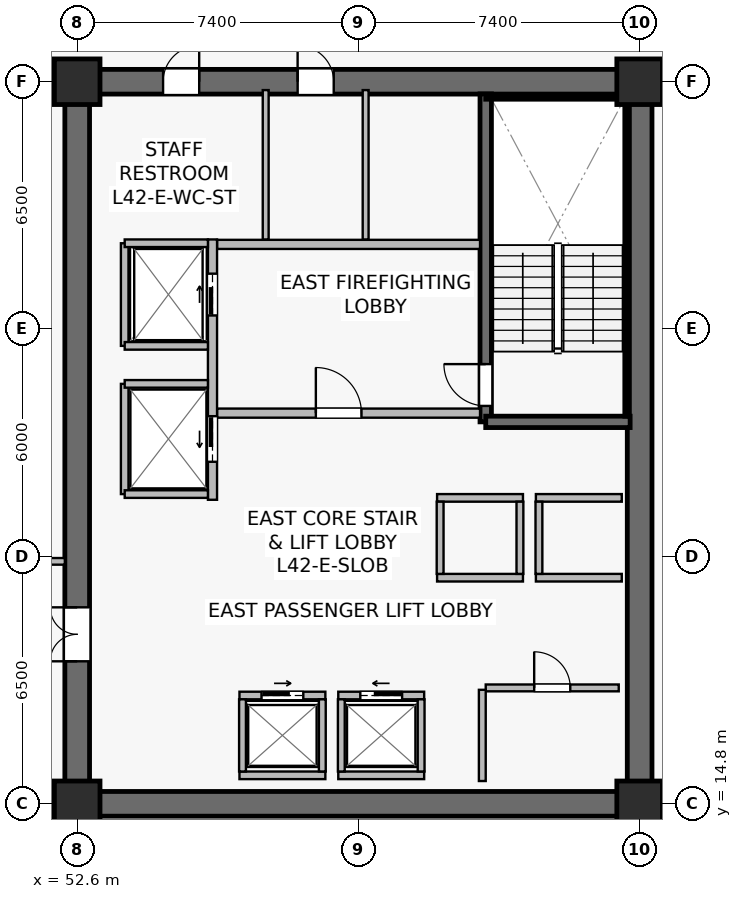
"""IFC4 building model, lengths in metres.
Left out: names, types, materials, properties, quantities, classifications, styles, units other than length and angle.
Written with IfcOpenShell. Run it as: python <this file> out.ifc"""

import sys

from ifc_helpers import new_model, si_unit, direction, frame, frame_2d, origin, origin_2d, place, context, subcontext, project, spatial, rectangle, extrude, source, transform, mapped, element, fill, save


model = new_model("IFC4")
c1 = context("Model", 3, precision=1e-05, world=origin(), true_north=direction((0.0, 1.0)))
c2 = subcontext(c1, "Body", "Model", "MODEL_VIEW")
j1 = project(units=[si_unit("LENGTHUNIT", "METRE"), si_unit("PLANEANGLEUNIT", "RADIAN")], contexts=[c1])
p1 = place(None, origin())
s1 = spatial("IfcSite", under=j1, at=p1, CompositionType="ELEMENT")
p2 = place(p1, origin())
s2 = spatial("IfcBuilding", under=s1, at=p2, CompositionType="ELEMENT")
p3 = place(p2, frame((0.0, 0.0, 174.8)))
s3 = spatial("IfcBuildingStorey", under=s2, at=p3, CompositionType="ELEMENT", Elevation=174.8)
p4 = place(p3, frame((52.275, 14.8, 0.0), z_axis=(0.0, 0.0, 1.0), x_axis=(1.0, 0.0, 0.0)))
e1 = element("IfcWall", 1, at=p4, inside=s3, PredefinedType="SHEAR", context=c2, shape_type="SweptSolid", body=[
    extrude(rectangle(XDim=15.45, YDim=0.65, at=frame_2d((7.725, 0.0))), origin(), (0.0, 0.0, 1.0), 3.79),
])
p5 = place(p3, frame((52.275, 33.8, 0.0), z_axis=(0.0, 0.0, 1.0), x_axis=(1.0, 0.0, 0.0)))
e2 = element("IfcWall", 2, at=p5, inside=s3, PredefinedType="SHEAR", context=c2, shape_type="SweptSolid", body=[
    extrude(rectangle(XDim=15.45, YDim=0.65, at=frame_2d((7.725, 0.0))), origin(), (0.0, 0.0, 1.0), 3.79),
])
p6 = place(p5, frame((6.125, 0.0, 0.0)))
e3 = element("IfcOpeningElement", 3, at=p6, cuts=e2, PredefinedType="OPENING", context=c2, shape_type="SweptSolid", body=[
    extrude(rectangle(XDim=0.95, YDim=2.15, at=frame_2d((0.475, 1.075))), frame((0.0, 0.335, 0.0), z_axis=(0.0, -1.0, 0.0), x_axis=(1.0, 0.0, 0.0)), (0.0, 0.0, 1.0), 0.67),
])
p7 = place(p5, frame((2.585, 0.0, 0.0)))
e4 = element("IfcOpeningElement", 4, at=p7, cuts=e2, PredefinedType="OPENING", context=c2, shape_type="SweptSolid", body=[
    extrude(rectangle(XDim=0.95, YDim=2.15, at=frame_2d((0.475, 1.075))), frame((0.0, 0.335, 0.0), z_axis=(0.0, -1.0, 0.0), x_axis=(1.0, 0.0, 0.0)), (0.0, 0.0, 1.0), 0.67),
])
p8 = place(p3, frame((52.6, 15.125, 0.0), z_axis=(0.0, 0.0, 1.0), x_axis=(0.0, 1.0, 0.0)))
e5 = element("IfcWall", 5, at=p8, inside=s3, PredefinedType="SHEAR", context=c2, shape_type="SweptSolid", body=[
    extrude(rectangle(XDim=18.35, YDim=0.65, at=frame_2d((9.175, 0.0))), origin(), (0.0, 0.0, 1.0), 3.79),
])
p9 = place(p8, frame((3.425, 0.0, 0.0)))
e6 = element("IfcOpeningElement", 6, at=p9, cuts=e5, PredefinedType="OPENING", context=c2, shape_type="SweptSolid", body=[
    extrude(rectangle(XDim=1.42, YDim=2.2, at=frame_2d((0.71, 1.1))), frame((0.0, 0.335, 0.0), z_axis=(0.0, -1.0, 0.0), x_axis=(1.0, 0.0, 0.0)), (0.0, 0.0, 1.0), 0.67),
])
p10 = place(p3, frame((67.4, 15.125, 0.0), z_axis=(0.0, 0.0, 1.0), x_axis=(0.0, 1.0, 0.0)))
e7 = element("IfcWall", 7, at=p10, inside=s3, PredefinedType="SHEAR", context=c2, shape_type="SweptSolid", body=[
    extrude(rectangle(XDim=18.35, YDim=0.65, at=frame_2d((9.175, 0.0))), origin(), (0.0, 0.0, 1.0), 3.79),
])
p11 = place(p3, frame((63.35, 24.85, 0.0), z_axis=(0.0, 0.0, 1.0), x_axis=(0.0, 1.0, 0.0)))
e8 = element("IfcWall", 8, at=p11, inside=s3, PredefinedType="SHEAR", context=c2, shape_type="SweptSolid", body=[
    extrude(rectangle(XDim=8.63, YDim=0.3, at=frame_2d((4.315, 0.0))), origin(), (0.0, 0.0, 1.0), 3.79),
])
p12 = place(p11, frame((0.42, 0.0, 0.0)))
e9 = element("IfcOpeningElement", 9, at=p12, cuts=e8, PredefinedType="OPENING", context=c2, shape_type="SweptSolid", body=[
    extrude(rectangle(XDim=1.1, YDim=2.15, at=frame_2d((0.55, 1.075))), frame((0.0, 0.16, 0.0), z_axis=(0.0, -1.0, 0.0), x_axis=(1.0, 0.0, 0.0)), (0.0, 0.0, 1.0), 0.32),
])
p13 = place(p3, frame((63.35, 24.85, 0.0), z_axis=(0.0, 0.0, 1.0), x_axis=(1.0, 0.0, 0.0)))
e10 = element("IfcWall", 10, at=p13, inside=s3, PredefinedType="SHEAR", context=c2, shape_type="SweptSolid", body=[
    extrude(rectangle(XDim=3.8, YDim=0.3, at=frame_2d((1.9, 0.0))), origin(), (0.0, 0.0, 1.0), 3.79),
])
p14 = place(p3, frame((63.35, 33.4, 0.0), z_axis=(0.0, 0.0, 1.0), x_axis=(1.0, 0.0, 0.0)))
e11 = element("IfcWall", 11, at=p14, inside=s3, PredefinedType="SOLIDWALL", context=c2, shape_type="SweptSolid", body=[
    extrude(rectangle(XDim=3.72, YDim=0.12, at=frame_2d((1.86, 0.0))), origin(), (0.0, 0.0, 1.0), 3.79),
])
p15 = place(p3, frame((67.07, 25.0, 0.0), z_axis=(0.0, 0.0, 1.0), x_axis=(0.0, 1.0, 0.0)))
e12 = element("IfcWall", 12, at=p15, inside=s3, PredefinedType="SOLIDWALL", context=c2, shape_type="SweptSolid", body=[
    extrude(rectangle(XDim=8.32, YDim=0.12, at=frame_2d((4.16, 0.0))), origin(), (0.0, 0.0, 1.0), 3.79),
])
m1 = source(origin(), c2, "Body", "SweptSolid", [
    extrude(rectangle(XDim=1.2, YDim=1.2, at=origin_2d()), origin(), (0.0, 0.0, 1.0), 4.1),
])
for number, where, z_axis, x_axis in (
    (13, (52.6, 14.8, 0.0), (0.0, 0.0, 1.0), (1.0, 0.0, 0.0)),
    (14, (67.4, 14.8, 0.0), (0.0, 0.0, 1.0), (1.0, 0.0, 0.0)),
    (15, (52.6, 33.8, 0.0), (0.0, 0.0, 1.0), (1.0, 0.0, 0.0)),
    (16, (67.4, 33.8, 0.0), (0.0, 0.0, 1.0), (1.0, 0.0, 0.0)),
):
    element("IfcColumn", number, at=place(p3, frame(where, z_axis=z_axis, x_axis=x_axis)), inside=s3, PredefinedType="COLUMN", context=c2, shape_type="MappedRepresentation", body=[
        mapped(m1, transform((0.0, 0.0, 0.0), scale=1.0)),
    ])
p16 = place(p3, frame((56.28, 25.08, 0.0), z_axis=(0.0, 0.0, 1.0), x_axis=(1.0, 0.0, 0.0)))
e17 = element("IfcWall", 17, at=p16, inside=s3, PredefinedType="SOLIDWALL", context=c2, shape_type="SweptSolid", body=[
    extrude(rectangle(XDim=6.92, YDim=0.24, at=frame_2d((3.46, 0.0))), origin(), (0.0, 0.0, 1.0), 3.187),
])
p17 = place(p16, frame((2.6, 0.0, 0.0)))
e18 = element("IfcOpeningElement", 18, at=p17, cuts=e17, PredefinedType="OPENING", context=c2, shape_type="SweptSolid", body=[
    extrude(rectangle(XDim=1.2, YDim=2.16, at=frame_2d((0.6, 1.08))), frame((0.0, 0.13, 0.0), z_axis=(0.0, -1.0, 0.0), x_axis=(1.0, 0.0, 0.0)), (0.0, 0.0, 1.0), 0.26),
])
p18 = place(p3, frame((56.28, 29.52, 0.0), z_axis=(0.0, 0.0, 1.0), x_axis=(1.0, 0.0, 0.0)))
e19 = element("IfcWall", 19, at=p18, inside=s3, PredefinedType="SOLIDWALL", context=c2, shape_type="SweptSolid", body=[
    extrude(rectangle(XDim=6.92, YDim=0.24, at=frame_2d((3.46, 0.0))), origin(), (0.0, 0.0, 1.0), 3.187),
])
p19 = place(p3, frame((56.16, 22.8, 0.0), z_axis=(0.0, 0.0, 1.0), x_axis=(0.0, 1.0, 0.0)))
e20 = element("IfcWall", 20, at=p19, inside=s3, PredefinedType="SOLIDWALL", context=c2, shape_type="SweptSolid", body=[
    extrude(rectangle(XDim=6.85, YDim=0.24, at=frame_2d((3.425, 0.0))), origin(), (0.0, 0.0, 1.0), 2.925),
])
p20 = place(p19, frame((4.85, 0.0, 0.0)))
e21 = element("IfcOpeningElement", 21, at=p20, cuts=e20, PredefinedType="OPENING", context=c2, shape_type="SweptSolid", body=[
    extrude(rectangle(XDim=1.1, YDim=2.22, at=frame_2d((0.55, 1.11))), frame((0.0, 0.13, 0.0), z_axis=(0.0, -1.0, 0.0), x_axis=(1.0, 0.0, 0.0)), (0.0, 0.0, 1.0), 0.26),
])
p21 = place(p19, frame((1.0, 0.0, 0.0)))
e22 = element("IfcOpeningElement", 22, at=p21, cuts=e20, PredefinedType="OPENING", context=c2, shape_type="SweptSolid", body=[
    extrude(rectangle(XDim=1.2, YDim=2.22, at=frame_2d((0.6, 1.11))), frame((0.0, 0.13, 0.0), z_axis=(0.0, -1.0, 0.0), x_axis=(1.0, 0.0, 0.0)), (0.0, 0.0, 1.0), 0.26),
])
p22 = place(p3, frame((59.47, 17.65, 0.0), z_axis=(0.0, 0.0, 1.0), x_axis=(1.0, 0.0, 0.0)))
e23 = element("IfcWall", 23, at=p22, inside=s3, PredefinedType="SOLIDWALL", context=c2, shape_type="SweptSolid", body=[
    extrude(rectangle(XDim=2.26, YDim=0.2, at=frame_2d((1.13, 0.0))), origin(), (0.0, 0.0, 1.0), 3.187),
])
p23 = place(p22, frame((0.58, 0.0, 0.0)))
e24 = element("IfcOpeningElement", 24, at=p23, cuts=e23, PredefinedType="OPENING", context=c2, shape_type="SweptSolid", body=[
    extrude(rectangle(XDim=1.1, YDim=2.22, at=frame_2d((0.55, 1.11))), frame((0.0, 0.11, 0.0), z_axis=(0.0, -1.0, 0.0), x_axis=(1.0, 0.0, 0.0)), (0.0, 0.0, 1.0), 0.22),
])
p24 = place(p3, frame((59.47, 15.55, 0.0), z_axis=(0.0, 0.0, 1.0), x_axis=(1.0, 0.0, 0.0)))
e25 = element("IfcWall", 25, at=p24, inside=s3, PredefinedType="SOLIDWALL", context=c2, shape_type="SweptSolid", body=[
    extrude(rectangle(XDim=2.26, YDim=0.2, at=frame_2d((1.13, 0.0))), origin(), (0.0, 0.0, 1.0), 3.187),
])
for number, where, z_axis, x_axis in (
    (26, (59.55, 15.65, 0.0), (0.0, 0.0, 1.0), (0.0, 1.0, 0.0)),
    (27, (61.65, 15.65, 0.0), (0.0, 0.0, 1.0), (0.0, 1.0, 0.0)),
):
    element("IfcWall", number, at=place(p3, frame(where, z_axis=z_axis, x_axis=x_axis)), inside=s3, PredefinedType="SOLIDWALL", context=c2, shape_type="SweptSolid", body=[
        extrude(rectangle(XDim=1.9, YDim=0.18, at=frame_2d((0.95, 0.0))), origin(), (0.0, 0.0, 1.0), 3.79),
    ])
p25 = place(p3, frame((56.87, 17.65, 0.0), z_axis=(0.0, 0.0, 1.0), x_axis=(1.0, 0.0, 0.0)))
e28 = element("IfcWall", 28, at=p25, inside=s3, PredefinedType="SOLIDWALL", context=c2, shape_type="SweptSolid", body=[
    extrude(rectangle(XDim=2.26, YDim=0.2, at=frame_2d((1.13, 0.0))), origin(), (0.0, 0.0, 1.0), 3.79),
])
p26 = place(p25, frame((0.58, 0.0, 0.0)))
e29 = element("IfcOpeningElement", 29, at=p26, cuts=e28, PredefinedType="OPENING", context=c2, shape_type="SweptSolid", body=[
    extrude(rectangle(XDim=1.1, YDim=2.22, at=frame_2d((0.55, 1.11))), frame((0.0, 0.11, 0.0), z_axis=(0.0, -1.0, 0.0), x_axis=(1.0, 0.0, 0.0)), (0.0, 0.0, 1.0), 0.22),
])
p27 = place(p3, frame((56.87, 15.55, 0.0), z_axis=(0.0, 0.0, 1.0), x_axis=(1.0, 0.0, 0.0)))
e30 = element("IfcWall", 30, at=p27, inside=s3, PredefinedType="SOLIDWALL", context=c2, shape_type="SweptSolid", body=[
    extrude(rectangle(XDim=2.26, YDim=0.2, at=frame_2d((1.13, 0.0))), origin(), (0.0, 0.0, 1.0), 3.79),
])
for number, where, z_axis, x_axis in (
    (31, (56.95, 15.65, 0.0), (0.0, 0.0, 1.0), (0.0, 1.0, 0.0)),
    (32, (59.05, 15.65, 0.0), (0.0, 0.0, 1.0), (0.0, 1.0, 0.0)),
):
    element("IfcWall", number, at=place(p3, frame(where, z_axis=z_axis, x_axis=x_axis)), inside=s3, PredefinedType="SOLIDWALL", context=c2, shape_type="SweptSolid", body=[
        extrude(rectangle(XDim=1.9, YDim=0.18, at=frame_2d((0.95, 0.0))), origin(), (0.0, 0.0, 1.0), 3.79),
    ])
for number, where, z_axis, x_axis in (
    (33, (64.67, 20.75, 0.0), (0.0, 0.0, 1.0), (1.0, 0.0, 0.0)),
    (34, (64.67, 22.85, 0.0), (0.0, 0.0, 1.0), (1.0, 0.0, 0.0)),
):
    element("IfcWall", number, at=place(p3, frame(where, z_axis=z_axis, x_axis=x_axis)), inside=s3, PredefinedType="SOLIDWALL", context=c2, shape_type="SweptSolid", body=[
        extrude(rectangle(XDim=2.26, YDim=0.2, at=frame_2d((1.13, 0.0))), origin(), (0.0, 0.0, 1.0), 3.79),
    ])
p28 = place(p3, frame((64.75, 20.85, 0.0), z_axis=(0.0, 0.0, 1.0), x_axis=(0.0, 1.0, 0.0)))
e35 = element("IfcWall", 35, at=p28, inside=s3, PredefinedType="SOLIDWALL", context=c2, shape_type="SweptSolid", body=[
    extrude(rectangle(XDim=1.9, YDim=0.18, at=frame_2d((0.95, 0.0))), origin(), (0.0, 0.0, 1.0), 3.79),
])
for number, where, z_axis, x_axis in (
    (36, (62.07, 20.75, 0.0), (0.0, 0.0, 1.0), (1.0, 0.0, 0.0)),
    (37, (62.07, 22.85, 0.0), (0.0, 0.0, 1.0), (1.0, 0.0, 0.0)),
):
    element("IfcWall", number, at=place(p3, frame(where, z_axis=z_axis, x_axis=x_axis)), inside=s3, PredefinedType="SOLIDWALL", context=c2, shape_type="SweptSolid", body=[
        extrude(rectangle(XDim=2.26, YDim=0.2, at=frame_2d((1.13, 0.0))), origin(), (0.0, 0.0, 1.0), 3.79),
    ])
for number, where, z_axis, x_axis in (
    (38, (62.15, 20.85, 0.0), (0.0, 0.0, 1.0), (0.0, 1.0, 0.0)),
    (39, (64.25, 20.85, 0.0), (0.0, 0.0, 1.0), (0.0, 1.0, 0.0)),
):
    element("IfcWall", number, at=place(p3, frame(where, z_axis=z_axis, x_axis=x_axis)), inside=s3, PredefinedType="SOLIDWALL", context=c2, shape_type="SweptSolid", body=[
        extrude(rectangle(XDim=1.9, YDim=0.18, at=frame_2d((0.95, 0.0))), origin(), (0.0, 0.0, 1.0), 3.79),
    ])
p29 = place(p3, frame((53.85, 26.85, 0.0), z_axis=(0.0, 0.0, 1.0), x_axis=(0.0, 1.0, 0.0)))
e40 = element("IfcWall", 40, at=p29, inside=s3, PredefinedType="SOLIDWALL", context=c2, shape_type="SweptSolid", body=[
    extrude(rectangle(XDim=2.7, YDim=0.2, at=frame_2d((1.35, 0.0))), origin(), (0.0, 0.0, 1.0), 3.79),
])
p30 = place(p3, frame((53.85, 29.55, 0.0), z_axis=(0.0, 0.0, 1.0), x_axis=(1.0, 0.0, 0.0)))
e41 = element("IfcWall", 41, at=p30, inside=s3, PredefinedType="SOLIDWALL", context=c2, shape_type="SweptSolid", body=[
    extrude(rectangle(XDim=2.19, YDim=0.2, at=frame_2d((1.095, 0.0))), origin(), (0.0, 0.0, 1.0), 3.79),
])
p31 = place(p3, frame((53.85, 26.85, 0.0), z_axis=(0.0, 0.0, 1.0), x_axis=(1.0, 0.0, 0.0)))
e42 = element("IfcWall", 42, at=p31, inside=s3, PredefinedType="SOLIDWALL", context=c2, shape_type="SweptSolid", body=[
    extrude(rectangle(XDim=2.19, YDim=0.2, at=frame_2d((1.095, 0.0))), origin(), (0.0, 0.0, 1.0), 3.187),
])
p32 = place(p3, frame((53.85, 22.95, 0.0), z_axis=(0.0, 0.0, 1.0), x_axis=(0.0, 1.0, 0.0)))
e43 = element("IfcWall", 43, at=p32, inside=s3, PredefinedType="SOLIDWALL", context=c2, shape_type="SweptSolid", body=[
    extrude(rectangle(XDim=2.9, YDim=0.2, at=frame_2d((1.45, 0.0))), origin(), (0.0, 0.0, 1.0), 2.925),
])
for number, where, z_axis, x_axis in (
    (44, (53.85, 25.85, 0.0), (0.0, 0.0, 1.0), (1.0, 0.0, 0.0)),
    (45, (53.85, 22.95, 0.0), (0.0, 0.0, 1.0), (1.0, 0.0, 0.0)),
):
    element("IfcWall", number, at=place(p3, frame(where, z_axis=z_axis, x_axis=x_axis)), inside=s3, PredefinedType="SOLIDWALL", context=c2, shape_type="SweptSolid", body=[
        extrude(rectangle(XDim=2.19, YDim=0.2, at=frame_2d((1.095, 0.0))), origin(), (0.0, 0.0, 1.0), 3.79),
    ])
p33 = place(p3, frame((63.35, 17.85, 0.0), z_axis=(0.0, 0.0, 1.0), x_axis=(1.0, 0.0, 0.0)))
e46 = element("IfcWall", 46, at=p33, inside=s3, PredefinedType="SOLIDWALL", context=c2, shape_type="SweptSolid", body=[
    extrude(rectangle(XDim=3.5, YDim=0.18, at=frame_2d((1.75, 0.0))), origin(), (0.0, 0.0, 1.0), 3.79),
])
p34 = place(p33, frame((1.275, 0.0, 0.0)))
e47 = element("IfcOpeningElement", 47, at=p34, cuts=e46, PredefinedType="OPENING", context=c2, shape_type="SweptSolid", body=[
    extrude(rectangle(XDim=0.95, YDim=2.15, at=frame_2d((0.475, 1.075))), frame((0.0, 0.1, 0.0), z_axis=(0.0, -1.0, 0.0), x_axis=(1.0, 0.0, 0.0)), (0.0, 0.0, 1.0), 0.2),
])
p35 = place(p3, frame((63.26, 15.4, 0.0), z_axis=(0.0, 0.0, 1.0), x_axis=(0.0, 1.0, 0.0)))
e48 = element("IfcWall", 48, at=p35, inside=s3, PredefinedType="SOLIDWALL", context=c2, shape_type="SweptSolid", body=[
    extrude(rectangle(XDim=2.4, YDim=0.18, at=frame_2d((1.2, 0.0))), origin(), (0.0, 0.0, 1.0), 3.79),
])
p36 = place(p3, frame((60.19, 29.65, 0.0), z_axis=(0.0, 0.0, 1.0), x_axis=(0.0, 1.0, 0.0)))
e49 = element("IfcWall", 49, at=p36, inside=s3, PredefinedType="PLUMBINGWALL", context=c2, shape_type="SweptSolid", body=[
    extrude(rectangle(XDim=3.93, YDim=0.155, at=frame_2d((1.965, 0.0))), origin(), (0.0, 0.0, 1.0), 3.187),
])
p37 = place(p3, frame((57.56, 29.65, 0.0), z_axis=(0.0, 0.0, 1.0), x_axis=(0.0, 1.0, 0.0)))
e50 = element("IfcWall", 50, at=p37, inside=s3, PredefinedType="PLUMBINGWALL", context=c2, shape_type="SweptSolid", body=[
    extrude(rectangle(XDim=3.93, YDim=0.155, at=frame_2d((1.965, 0.0))), origin(), (0.0, 0.0, 1.0), 3.79),
])
p38 = place(p3, frame((48.3, 34.26, 0.0), z_axis=(0.0, 0.0, 1.0), x_axis=(1.0, 0.0, 0.0)))
e51 = element("IfcWall", 51, at=p38, inside=s3, PredefinedType="PARTITIONING", context=c2, shape_type="SweptSolid", body=[
    extrude(rectangle(XDim=3.975, YDim=0.175, at=frame_2d((1.987, 0.0))), origin(), (0.0, 0.0, 1.0), 3.475),
])
p39 = place(p3, frame((48.3, 21.18, 0.0), z_axis=(0.0, 0.0, 1.0), x_axis=(1.0, 0.0, 0.0)))
e52 = element("IfcWall", 52, at=p39, inside=s3, PredefinedType="PARTITIONING", context=c2, shape_type="SweptSolid", body=[
    extrude(rectangle(XDim=3.975, YDim=0.175, at=frame_2d((1.987, 0.0))), origin(), (0.0, 0.0, 1.0), 3.79),
])
p40 = place(p39, frame((1.35, 0.0, 0.0)))
e53 = element("IfcOpeningElement", 53, at=p40, cuts=e52, PredefinedType="OPENING", context=c2, shape_type="SweptSolid", body=[
    extrude(rectangle(XDim=0.95, YDim=2.15, at=frame_2d((0.475, 1.075))), frame((0.0, 0.098, 0.0), z_axis=(0.0, -1.0, 0.0), x_axis=(1.0, 0.0, 0.0)), (0.0, 0.0, 1.0), 0.195),
])
m2 = source(origin(), c2, "Body", "SweptSolid", [
    extrude(rectangle(XDim=1.1, YDim=2.15, at=frame_2d((0.55, 1.075))), frame((0.0, 0.025, 0.0), z_axis=(0.0, -1.0, 0.0), x_axis=(1.0, 0.0, 0.0)), (0.0, 0.0, 1.0), 0.05),
])
p41 = place(p12, origin())
e54 = element("IfcDoor", 54, at=p41, inside=s3, OperationType="SINGLE_SWING_RIGHT", PredefinedType="DOOR", context=c2, shape_type="MappedRepresentation", body=[
    mapped(m2, transform((0.0, 0.0, 0.0), scale=1.0)),
])
fill(e9, e54)
m3 = source(origin(), c2, "Body", "SweptSolid", [
    extrude(rectangle(XDim=1.2, YDim=2.16, at=frame_2d((0.6, 1.08))), frame((0.0, 0.025, 0.0), z_axis=(0.0, -1.0, 0.0), x_axis=(1.0, 0.0, 0.0)), (0.0, 0.0, 1.0), 0.05),
])
p42 = place(p17, origin())
e55 = element("IfcDoor", 55, at=p42, inside=s3, OperationType="SINGLE_SWING_LEFT", PredefinedType="DOOR", context=c2, shape_type="MappedRepresentation", body=[
    mapped(m3, transform((0.0, 0.0, 0.0), scale=1.0)),
])
fill(e18, e55)
m4 = source(origin(), c2, "Body", "SweptSolid", [
    extrude(rectangle(XDim=1.1, YDim=2.22, at=frame_2d((0.55, 1.11))), frame((0.0, 0.025, 0.0), z_axis=(0.0, -1.0, 0.0), x_axis=(1.0, 0.0, 0.0)), (0.0, 0.0, 1.0), 0.05),
])
p43 = place(p23, origin())
e56 = element("IfcDoor", 56, at=p43, inside=s3, OperationType="SLIDING_TO_LEFT", PredefinedType="USERDEFINED", context=c2, shape_type="MappedRepresentation", body=[
    mapped(m4, transform((0.0, 0.0, 0.0), scale=1.0)),
])
fill(e24, e56)
p44 = place(p26, origin())
e57 = element("IfcDoor", 57, at=p44, inside=s3, OperationType="SLIDING_TO_RIGHT", PredefinedType="USERDEFINED", context=c2, shape_type="MappedRepresentation", body=[
    mapped(m4, transform((0.0, 0.0, 0.0), scale=1.0)),
])
fill(e29, e57)
p45 = place(p20, origin())
e58 = element("IfcDoor", 58, at=p45, inside=s3, OperationType="SLIDING_TO_RIGHT", PredefinedType="USERDEFINED", context=c2, shape_type="MappedRepresentation", body=[
    mapped(m4, transform((0.0, 0.0, 0.0), scale=1.0)),
])
fill(e21, e58)
m5 = source(origin(), c2, "Body", "SweptSolid", [
    extrude(rectangle(XDim=1.2, YDim=2.22, at=frame_2d((0.6, 1.11))), frame((0.0, 0.025, 0.0), z_axis=(0.0, -1.0, 0.0), x_axis=(1.0, 0.0, 0.0)), (0.0, 0.0, 1.0), 0.05),
])
p46 = place(p21, origin())
e59 = element("IfcDoor", 59, at=p46, inside=s3, OperationType="SLIDING_TO_LEFT", PredefinedType="USERDEFINED", context=c2, shape_type="MappedRepresentation", body=[
    mapped(m5, transform((0.0, 0.0, 0.0), scale=1.0)),
])
fill(e22, e59)
m6 = source(origin(), c2, "Body", "SweptSolid", [
    extrude(rectangle(XDim=0.95, YDim=2.15, at=frame_2d((0.475, 1.075))), frame((0.0, 0.025, 0.0), z_axis=(0.0, -1.0, 0.0), x_axis=(1.0, 0.0, 0.0)), (0.0, 0.0, 1.0), 0.05),
])
p47 = place(p34, origin())
e60 = element("IfcDoor", 60, at=p47, inside=s3, OperationType="SINGLE_SWING_LEFT", PredefinedType="DOOR", context=c2, shape_type="MappedRepresentation", body=[
    mapped(m6, transform((0.0, 0.0, 0.0), scale=1.0)),
])
fill(e47, e60)
m7 = source(origin(), c2, "Body", "SweptSolid", [
    extrude(rectangle(XDim=1.42, YDim=2.2, at=frame_2d((0.71, 1.1))), frame((0.0, 0.025, 0.0), z_axis=(0.0, -1.0, 0.0), x_axis=(1.0, 0.0, 0.0)), (0.0, 0.0, 1.0), 0.05),
])
p48 = place(p9, origin())
e61 = element("IfcDoor", 61, at=p48, inside=s3, OperationType="DOUBLE_DOOR_SINGLE_SWING", PredefinedType="DOOR", context=c2, shape_type="MappedRepresentation", body=[
    mapped(m7, transform((0.0, 0.0, 0.0), scale=1.0)),
])
fill(e6, e61)
p49 = place(p6, origin())
e62 = element("IfcDoor", 62, at=p49, inside=s3, OperationType="SINGLE_SWING_LEFT", PredefinedType="DOOR", context=c2, shape_type="MappedRepresentation", body=[
    mapped(m6, transform((0.0, 0.0, 0.0), scale=1.0)),
])
fill(e3, e62)
p50 = place(p7, origin())
e63 = element("IfcDoor", 63, at=p50, inside=s3, OperationType="SINGLE_SWING_RIGHT", PredefinedType="DOOR", context=c2, shape_type="MappedRepresentation", body=[
    mapped(m6, transform((0.0, 0.0, 0.0), scale=1.0)),
])
fill(e4, e63)
save(model, sys.argv[1])
